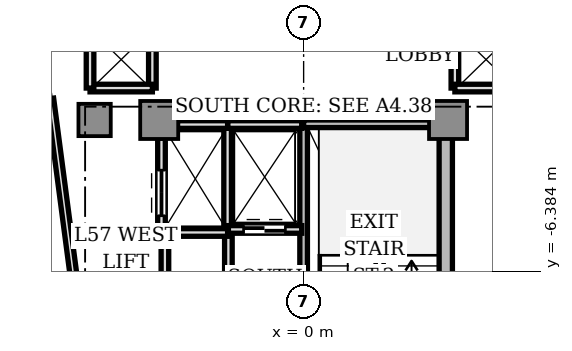
"""IFC4 building model, lengths in metres.
Left out: names, types, materials, properties, quantities, classifications, styles, units other than length and angle.
Written with IfcOpenShell. Run it as: python <this file> out.ifc"""

import sys

from ifc_helpers import new_model, si_unit, direction, frame, frame_2d, origin, origin_2d, place, context, subcontext, project, spatial, rectangle, extrude, source, transform, mapped, element, fill, save


model = new_model("IFC4")
c1 = context("Model", 3, precision=1e-05, world=origin(), true_north=direction((0.0, 1.0)))
c2 = subcontext(c1, "Body", "Model", "MODEL_VIEW")
j1 = project(units=[si_unit("LENGTHUNIT", "METRE"), si_unit("PLANEANGLEUNIT", "RADIAN")], contexts=[c1])
p1 = place(None, origin())
s1 = spatial("IfcSite", under=j1, at=p1, CompositionType="ELEMENT")
p2 = place(p1, origin())
s2 = spatial("IfcBuilding", under=s1, at=p2, CompositionType="ELEMENT")
p3 = place(p2, frame((0.0, 0.0, 206.5)))
s3 = spatial("IfcBuildingStorey", under=s2, at=p3, CompositionType="ELEMENT", Elevation=206.5)
p4 = place(p3, frame((3.74, -9.75, 0.0), z_axis=(0.0, 0.0, 1.0), x_axis=(0.0, 1.0, 0.0)))
e1 = element("IfcWall", 1, at=p4, inside=s3, PredefinedType="SHEAR", context=c2, shape_type="SweptSolid", body=[
    extrude(rectangle(XDim=6.9, YDim=0.35, at=frame_2d((3.45, 0.0))), origin(), (0.0, 0.0, 1.0), 3.11),
])
m1 = source(origin(), c2, "Body", "SweptSolid", [
    extrude(rectangle(XDim=1.0, YDim=1.0, at=origin_2d()), origin(), (0.0, 0.0, 1.0), 3.11),
])
for number, where, z_axis, x_axis in (
    (2, (-3.8, -2.4, 0.0), (0.0, 0.0, 1.0), (1.0, 0.0, 0.0)),
    (3, (3.8, -2.4, 0.0), (0.0, 0.0, 1.0), (1.0, 0.0, 0.0)),
):
    element("IfcColumn", number, at=place(p3, frame(where, z_axis=z_axis, x_axis=x_axis)), inside=s3, PredefinedType="COLUMN", context=c2, shape_type="MappedRepresentation", body=[
        mapped(m1, transform((0.0, 0.0, 0.0), scale=1.0)),
    ])
m2 = source(origin(), c2, "Body", "SweptSolid", [
    extrude(rectangle(XDim=0.85, YDim=0.85, at=origin_2d()), origin(), (0.0, 0.0, 1.0), 3.11),
])
p5 = place(p3, frame((-5.5, -2.4, 0.0), z_axis=(0.0, 0.0, 1.0), x_axis=(1.0, 0.0, 0.0)))
e4 = element("IfcColumn", 4, at=p5, inside=s3, PredefinedType="COLUMN", context=c2, shape_type="MappedRepresentation", body=[
    mapped(m2, transform((0.0, 0.0, 0.0), scale=1.0)),
])
p6 = place(p3, frame((-4.864, -6.339, 0.0), z_axis=(0.0, 0.0, 1.0), x_axis=(0.130564442062, -0.991439824936, 0.0)))
e5 = element("IfcWall", 5, at=p6, inside=s3, PredefinedType="STANDARD", context=c2, shape_type="SweptSolid", body=[
    extrude(rectangle(XDim=2.7, YDim=0.22, at=frame_2d((1.35, 0.0))), origin(), (0.0, 0.0, 1.0), 3.11),
])
p7 = place(p6, frame((1.4, 0.0, 0.0)))
e6 = element("IfcOpeningElement", 6, at=p7, cuts=e5, PredefinedType="OPENING", context=c2, shape_type="SweptSolid", body=[
    extrude(rectangle(XDim=1.0, YDim=2.2, at=frame_2d((0.5, 1.1))), frame((0.0, 0.12, 0.0), z_axis=(0.0, -1.0, 0.0), x_axis=(1.0, 0.0, 0.0)), (0.0, 0.0, 1.0), 0.24),
])
p8 = place(p3, frame((0.0, -10.18, 0.0), z_axis=(0.0, 0.0, 1.0), x_axis=(0.0, 1.0, 0.0)))
e7 = element("IfcWall", 7, at=p8, inside=s3, PredefinedType="SOLIDWALL", context=c2, shape_type="SweptSolid", body=[
    extrude(rectangle(XDim=7.68, YDim=0.2, at=frame_2d((3.84, 0.0))), origin(), (0.0, 0.0, 1.0), 3.11),
])
p9 = place(p8, frame((0.28, 0.0, 0.0)))
e8 = element("IfcOpeningElement", 8, at=p9, cuts=e7, PredefinedType="OPENING", context=c2, shape_type="SweptSolid", body=[
    extrude(rectangle(XDim=1.1, YDim=2.15, at=frame_2d((0.55, 1.075))), frame((0.0, 0.11, 0.0), z_axis=(0.0, -1.0, 0.0), x_axis=(1.0, 0.0, 0.0)), (0.0, 0.0, 1.0), 0.22),
])
p10 = place(p3, frame((0.0, -2.5, 0.0), z_axis=(0.0, 0.0, 1.0), x_axis=(1.0, 0.0, 0.0)))
e9 = element("IfcWall", 9, at=p10, inside=s3, PredefinedType="SOLIDWALL", context=c2, shape_type="SweptSolid", body=[
    extrude(rectangle(XDim=3.72, YDim=0.2, at=frame_2d((1.86, 0.0))), origin(), (0.0, 0.0, 1.0), 3.11),
])
p11 = place(p3, frame((-1.98, -9.98, 0.0), z_axis=(0.0, 0.0, 1.0), x_axis=(0.0, 1.0, 0.0)))
e10 = element("IfcWall", 10, at=p11, inside=s3, PredefinedType="SOLIDWALL", context=c2, shape_type="SweptSolid", body=[
    extrude(rectangle(XDim=4.66, YDim=0.2, at=frame_2d((2.33, 0.0))), origin(), (0.0, 0.0, 1.0), 2.66),
])
p12 = place(p11, frame((0.2, 0.0, 0.0)))
e11 = element("IfcOpeningElement", 11, at=p12, cuts=e10, PredefinedType="OPENING", context=c2, shape_type="SweptSolid", body=[
    extrude(rectangle(XDim=0.85, YDim=2.1, at=frame_2d((0.425, 1.05))), frame((0.0, 0.11, 0.0), z_axis=(0.0, -1.0, 0.0), x_axis=(1.0, 0.0, 0.0)), (0.0, 0.0, 1.0), 0.22),
])
p13 = place(p3, frame((-2.0, -5.28, 0.0), z_axis=(0.0, 0.0, 1.0), x_axis=(0.0, 1.0, 0.0)))
e12 = element("IfcWall", 12, at=p13, inside=s3, PredefinedType="SOLIDWALL", context=c2, shape_type="SweptSolid", body=[
    extrude(rectangle(XDim=2.78, YDim=0.2, at=frame_2d((1.39, 0.0))), origin(), (0.0, 0.0, 1.0), 2.66),
])
p14 = place(p3, frame((-2.0, -2.52, 0.0), z_axis=(0.0, 0.0, 1.0), x_axis=(1.0, 0.0, 0.0)))
e13 = element("IfcWall", 13, at=p14, inside=s3, PredefinedType="SOLIDWALL", context=c2, shape_type="SweptSolid", body=[
    extrude(rectangle(XDim=1.95, YDim=0.2, at=frame_2d((0.975, 0.0))), origin(), (0.0, 0.0, 1.0), 2.66),
])
p15 = place(p3, frame((-1.98, -5.28, 0.0), z_axis=(0.0, 0.0, 1.0), x_axis=(1.0, 0.0, 0.0)))
e14 = element("IfcWall", 14, at=p15, inside=s3, PredefinedType="SOLIDWALL", context=c2, shape_type="SweptSolid", body=[
    extrude(rectangle(XDim=1.93, YDim=0.2, at=frame_2d((0.965, 0.0))), origin(), (0.0, 0.0, 1.0), 2.66),
])
p16 = place(p15, frame((0.4, 0.0, 0.0)))
e15 = element("IfcOpeningElement", 15, at=p16, cuts=e14, PredefinedType="OPENING", context=c2, shape_type="SweptSolid", body=[
    extrude(rectangle(XDim=1.1, YDim=2.2, at=frame_2d((0.55, 1.1))), frame((0.0, 0.11, 0.0), z_axis=(0.0, -1.0, 0.0), x_axis=(1.0, 0.0, 0.0)), (0.0, 0.0, 1.0), 0.22),
])
p17 = place(p3, frame((-3.32, -2.52, 0.0), z_axis=(0.0, 0.0, 1.0), x_axis=(1.0, 0.0, 0.0)))
e16 = element("IfcWall", 16, at=p17, inside=s3, PredefinedType="SOLIDWALL", context=c2, shape_type="SweptSolid", body=[
    extrude(rectangle(XDim=1.32, YDim=0.2, at=frame_2d((0.66, 0.0))), origin(), (0.0, 0.0, 1.0), 2.66),
])
p18 = place(p3, frame((-3.74, -5.36, 0.0), z_axis=(0.0, 0.0, 1.0), x_axis=(1.0, 0.0, 0.0)))
e17 = element("IfcWall", 17, at=p18, inside=s3, PredefinedType="SOLIDWALL", context=c2, shape_type="SweptSolid", body=[
    extrude(rectangle(XDim=1.74, YDim=0.2, at=frame_2d((0.87, 0.0))), origin(), (0.0, 0.0, 1.0), 2.66),
])
p19 = place(p3, frame((-3.74, -5.36, 0.0), z_axis=(0.0, 0.0, 1.0), x_axis=(0.0, 1.0, 0.0)))
e18 = element("IfcWall", 18, at=p19, inside=s3, PredefinedType="SOLIDWALL", context=c2, shape_type="SweptSolid", body=[
    extrude(rectangle(XDim=2.48, YDim=0.2, at=frame_2d((1.24, 0.0))), origin(), (0.0, 0.0, 1.0), 2.66),
])
p20 = place(p19, frame((0.44, 0.0, 0.0)))
e19 = element("IfcOpeningElement", 19, at=p20, cuts=e18, PredefinedType="OPENING", context=c2, shape_type="SweptSolid", body=[
    extrude(rectangle(XDim=1.2, YDim=2.2, at=frame_2d((0.6, 1.1))), frame((0.0, 0.11, 0.0), z_axis=(0.0, -1.0, 0.0), x_axis=(1.0, 0.0, 0.0)), (0.0, 0.0, 1.0), 0.22),
])
p21 = place(p3, frame((3.98, -1.56, 0.0), z_axis=(0.0, 0.0, 1.0), x_axis=(0.0, 1.0, 0.0)))
e20 = element("IfcWall", 20, at=p21, inside=s3, PredefinedType="SOLIDWALL", context=c2, shape_type="SweptSolid", body=[
    extrude(rectangle(XDim=3.12, YDim=0.2, at=frame_2d((1.56, 0.0))), origin(), (0.0, 0.0, 1.0), 2.33),
])
p22 = place(p3, frame((3.98, -1.56, 0.0), z_axis=(0.0, 0.0, 1.0), x_axis=(1.0, 0.0, 0.0)))
e21 = element("IfcWall", 21, at=p22, inside=s3, PredefinedType="SOLIDWALL", context=c2, shape_type="SweptSolid", body=[
    extrude(rectangle(XDim=1.64, YDim=0.2, at=frame_2d((0.82, 0.0))), origin(), (0.0, 0.0, 1.0), 2.66),
])
p23 = place(p3, frame((-3.98, -1.56, 0.0), z_axis=(0.0, 0.0, 1.0), x_axis=(0.0, 1.0, 0.0)))
e22 = element("IfcWall", 22, at=p23, inside=s3, PredefinedType="SOLIDWALL", context=c2, shape_type="SweptSolid", body=[
    extrude(rectangle(XDim=3.12, YDim=0.2, at=frame_2d((1.56, 0.0))), origin(), (0.0, 0.0, 1.0), 2.33),
])
p24 = place(p3, frame((-5.62, -1.56, 0.0), z_axis=(0.0, 0.0, 1.0), x_axis=(1.0, 0.0, 0.0)))
e23 = element("IfcWall", 23, at=p24, inside=s3, PredefinedType="SOLIDWALL", context=c2, shape_type="SweptSolid", body=[
    extrude(rectangle(XDim=1.64, YDim=0.2, at=frame_2d((0.82, 0.0))), origin(), (0.0, 0.0, 1.0), 2.66),
])
p25 = place(p3, frame((-5.62, -1.56, 0.0), z_axis=(0.0, 0.0, 1.0), x_axis=(0.0, 1.0, 0.0)))
e24 = element("IfcWall", 24, at=p25, inside=s3, PredefinedType="SOLIDWALL", context=c2, shape_type="SweptSolid", body=[
    extrude(rectangle(XDim=1.56, YDim=0.2, at=frame_2d((0.78, 0.0))), origin(), (0.0, 0.0, 1.0), 2.66),
])
p26 = place(p3, frame((-3.65, -8.81, 0.0), z_axis=(0.0, 0.0, 1.0), x_axis=(0.0, 1.0, 0.0)))
e25 = element("IfcWall", 25, at=p26, inside=s3, PredefinedType="SOLIDWALL", context=c2, shape_type="SweptSolid", body=[
    extrude(rectangle(XDim=3.43, YDim=0.2, at=frame_2d((1.715, 0.0))), origin(), (0.0, 0.0, 1.0), 2.66),
])
p27 = place(p26, frame((1.2, 0.0, 0.0)))
e26 = element("IfcOpeningElement", 26, at=p27, cuts=e25, PredefinedType="OPENING", context=c2, shape_type="SweptSolid", body=[
    extrude(rectangle(XDim=0.95, YDim=2.15, at=frame_2d((0.475, 1.075))), frame((0.0, 0.11, 0.0), z_axis=(0.0, -1.0, 0.0), x_axis=(1.0, 0.0, 0.0)), (0.0, 0.0, 1.0), 0.22),
])
p28 = place(p3, frame((-6.667, -1.836, 0.0), z_axis=(0.0, 0.0, 1.0), x_axis=(0.13051970184, -0.991445715827, 0.0)))
e27 = element("IfcWall", 27, at=p28, inside=s3, PredefinedType="PARTITIONING", context=c2, shape_type="SweptSolid", body=[
    extrude(rectangle(XDim=4.65, YDim=0.18, at=frame_2d((2.325, 0.0))), origin(), (0.0, 0.0, 1.0), 2.66),
])
m3 = source(origin(), c2, "Body", "SweptSolid", [
    extrude(rectangle(XDim=1.1, YDim=0.05, at=origin_2d()), origin(), (0.0, 0.0, 1.0), 2.2),
])
p29 = place(p16, frame((0.55, 0.0, 0.0)))
e28 = element("IfcDoor", 28, at=p29, inside=s3, OperationType="DOUBLE_DOOR_SLIDING", PredefinedType="DOOR", context=c2, shape_type="MappedRepresentation", body=[
    mapped(m3, transform((0.0, 0.0, 0.0), scale=1.0)),
])
fill(e15, e28)
m4 = source(origin(), c2, "Body", "SweptSolid", [
    extrude(rectangle(XDim=1.2, YDim=0.05, at=origin_2d()), origin(), (0.0, 0.0, 1.0), 2.2),
])
p30 = place(p20, frame((0.6, 0.0, 0.0)))
e29 = element("IfcDoor", 29, at=p30, inside=s3, OperationType="DOUBLE_DOOR_SLIDING", PredefinedType="DOOR", context=c2, shape_type="MappedRepresentation", body=[
    mapped(m4, transform((0.0, 0.0, 0.0), scale=1.0)),
])
fill(e19, e29)
save(model, sys.argv[1])
